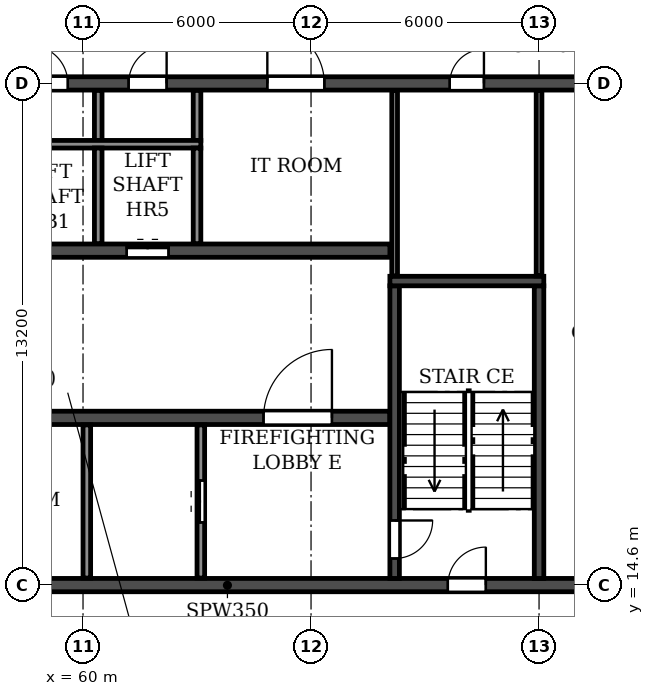
"""IFC4 building model, lengths in metres.
Left out: names, types, materials, properties, quantities, classifications, styles, units other than length and angle.
Written with IfcOpenShell. Run it as: python <this file> out.ifc"""

import sys

from ifc_helpers import new_model, si_unit, direction, frame, frame_2d, origin, place, context, subcontext, project, spatial, rectangle, extrude, element, fill, save


model = new_model("IFC4")
c1 = context("Model", 3, precision=1e-05, world=origin(), true_north=direction((0.0, 1.0)))
c2 = subcontext(c1, "Body", "Model", "MODEL_VIEW")
j1 = project(units=[si_unit("LENGTHUNIT", "METRE"), si_unit("PLANEANGLEUNIT", "RADIAN")], contexts=[c1])
p1 = place(None, origin())
s1 = spatial("IfcSite", under=j1, at=p1, CompositionType="ELEMENT")
p2 = place(p1, origin())
s2 = spatial("IfcBuilding", under=s1, at=p2, CompositionType="ELEMENT")
p3 = place(p2, frame((0.0, 0.0, 251.1)))
s3 = spatial("IfcBuildingStorey", under=s2, at=p3, CompositionType="ELEMENT", Elevation=251.1)
p4 = place(p3, frame((18.2, 14.6, 0.0), z_axis=(0.0, 0.0, 1.0), x_axis=(1.0, 0.0, 0.0)))
e1 = element("IfcWall", 1, at=p4, inside=s3, PredefinedType="SOLIDWALL", context=c2, shape_type="SweptSolid", body=[
    extrude(rectangle(XDim=65.6, YDim=0.35, at=frame_2d((32.8, 0.0))), origin(), (0.0, 0.0, 1.0), 3.08),
])
p5 = place(p4, frame((0.7, 0.0, 0.0)))
e2 = element("IfcOpeningElement", 2, at=p5, cuts=e1, PredefinedType="OPENING", context=c2, shape_type="SweptSolid", body=[
    extrude(rectangle(XDim=1.0, YDim=2.1, at=frame_2d((0.5, 1.05))), frame((0.0, 0.185, 0.0), z_axis=(0.0, -1.0, 0.0), x_axis=(1.0, 0.0, 0.0)), (0.0, 0.0, 1.0), 0.37),
])
p6 = place(p4, frame((8.6, 0.0, 0.0)))
e3 = element("IfcOpeningElement", 3, at=p6, cuts=e1, PredefinedType="OPENING", context=c2, shape_type="SweptSolid", body=[
    extrude(rectangle(XDim=1.0, YDim=2.1, at=frame_2d((0.5, 1.05))), frame((0.0, 0.185, 0.0), z_axis=(0.0, -1.0, 0.0), x_axis=(1.0, 0.0, 0.0)), (0.0, 0.0, 1.0), 0.37),
])
p7 = place(p4, frame((13.2, 0.0, 0.0)))
e4 = element("IfcOpeningElement", 4, at=p7, cuts=e1, PredefinedType="OPENING", context=c2, shape_type="SweptSolid", body=[
    extrude(rectangle(XDim=1.0, YDim=2.1, at=frame_2d((0.5, 1.05))), frame((0.0, 0.185, 0.0), z_axis=(0.0, -1.0, 0.0), x_axis=(1.0, 0.0, 0.0)), (0.0, 0.0, 1.0), 0.37),
])
p8 = place(p4, frame((24.5, 0.0, 0.0)))
e5 = element("IfcOpeningElement", 5, at=p8, cuts=e1, PredefinedType="OPENING", context=c2, shape_type="SweptSolid", body=[
    extrude(rectangle(XDim=1.0, YDim=2.1, at=frame_2d((0.5, 1.05))), frame((0.0, 0.185, 0.0), z_axis=(0.0, -1.0, 0.0), x_axis=(1.0, 0.0, 0.0)), (0.0, 0.0, 1.0), 0.37),
])
p9 = place(p4, frame((28.4, 0.0, 0.0)))
e6 = element("IfcOpeningElement", 6, at=p9, cuts=e1, PredefinedType="OPENING", context=c2, shape_type="SweptSolid", body=[
    extrude(rectangle(XDim=1.0, YDim=2.1, at=frame_2d((0.5, 1.05))), frame((0.0, 0.185, 0.0), z_axis=(0.0, -1.0, 0.0), x_axis=(1.0, 0.0, 0.0)), (0.0, 0.0, 1.0), 0.37),
])
p10 = place(p4, frame((32.3, 0.0, 0.0)))
e7 = element("IfcOpeningElement", 7, at=p10, cuts=e1, PredefinedType="OPENING", context=c2, shape_type="SweptSolid", body=[
    extrude(rectangle(XDim=1.0, YDim=2.1, at=frame_2d((0.5, 1.05))), frame((0.0, 0.185, 0.0), z_axis=(0.0, -1.0, 0.0), x_axis=(1.0, 0.0, 0.0)), (0.0, 0.0, 1.0), 0.37),
])
p11 = place(p4, frame((34.9, 0.0, 0.0)))
e8 = element("IfcOpeningElement", 8, at=p11, cuts=e1, PredefinedType="OPENING", context=c2, shape_type="SweptSolid", body=[
    extrude(rectangle(XDim=1.0, YDim=2.1, at=frame_2d((0.5, 1.05))), frame((0.0, 0.185, 0.0), z_axis=(0.0, -1.0, 0.0), x_axis=(1.0, 0.0, 0.0)), (0.0, 0.0, 1.0), 0.37),
])
p12 = place(p4, frame((38.8, 0.0, 0.0)))
e9 = element("IfcOpeningElement", 9, at=p12, cuts=e1, PredefinedType="OPENING", context=c2, shape_type="SweptSolid", body=[
    extrude(rectangle(XDim=1.0, YDim=2.1, at=frame_2d((0.5, 1.05))), frame((0.0, 0.185, 0.0), z_axis=(0.0, -1.0, 0.0), x_axis=(1.0, 0.0, 0.0)), (0.0, 0.0, 1.0), 0.37),
])
p13 = place(p4, frame((51.4, 0.0, 0.0)))
e10 = element("IfcOpeningElement", 10, at=p13, cuts=e1, PredefinedType="OPENING", context=c2, shape_type="SweptSolid", body=[
    extrude(rectangle(XDim=1.0, YDim=2.1, at=frame_2d((0.5, 1.05))), frame((0.0, 0.185, 0.0), z_axis=(0.0, -1.0, 0.0), x_axis=(1.0, 0.0, 0.0)), (0.0, 0.0, 1.0), 0.37),
])
p14 = place(p4, frame((56.0, 0.0, 0.0)))
e11 = element("IfcOpeningElement", 11, at=p14, cuts=e1, PredefinedType="OPENING", context=c2, shape_type="SweptSolid", body=[
    extrude(rectangle(XDim=1.0, YDim=2.1, at=frame_2d((0.5, 1.05))), frame((0.0, 0.185, 0.0), z_axis=(0.0, -1.0, 0.0), x_axis=(1.0, 0.0, 0.0)), (0.0, 0.0, 1.0), 0.37),
])
p15 = place(p4, frame((63.9, 0.0, 0.0)))
e12 = element("IfcOpeningElement", 12, at=p15, cuts=e1, PredefinedType="OPENING", context=c2, shape_type="SweptSolid", body=[
    extrude(rectangle(XDim=1.0, YDim=2.1, at=frame_2d((0.5, 1.05))), frame((0.0, 0.185, 0.0), z_axis=(0.0, -1.0, 0.0), x_axis=(1.0, 0.0, 0.0)), (0.0, 0.0, 1.0), 0.37),
])
p16 = place(p3, frame((18.2, 27.8, 0.0), z_axis=(0.0, 0.0, 1.0), x_axis=(1.0, 0.0, 0.0)))
e13 = element("IfcWall", 13, at=p16, inside=s3, PredefinedType="SOLIDWALL", context=c2, shape_type="SweptSolid", body=[
    extrude(rectangle(XDim=65.6, YDim=0.35, at=frame_2d((32.8, 0.0))), origin(), (0.0, 0.0, 1.0), 3.08),
])
p17 = place(p16, frame((0.7, 0.0, 0.0)))
e14 = element("IfcOpeningElement", 14, at=p17, cuts=e13, PredefinedType="OPENING", context=c2, shape_type="SweptSolid", body=[
    extrude(rectangle(XDim=1.0, YDim=2.1, at=frame_2d((0.5, 1.05))), frame((0.0, 0.185, 0.0), z_axis=(0.0, -1.0, 0.0), x_axis=(1.0, 0.0, 0.0)), (0.0, 0.0, 1.0), 0.37),
])
p18 = place(p16, frame((4.05, 0.0, 0.0)))
e15 = element("IfcOpeningElement", 15, at=p18, cuts=e13, PredefinedType="OPENING", context=c2, shape_type="SweptSolid", body=[
    extrude(rectangle(XDim=0.9, YDim=2.1, at=frame_2d((0.45, 1.05))), frame((0.0, 0.185, 0.0), z_axis=(0.0, -1.0, 0.0), x_axis=(1.0, 0.0, 0.0)), (0.0, 0.0, 1.0), 0.37),
])
p19 = place(p16, frame((13.25, 0.0, 0.0)))
e16 = element("IfcOpeningElement", 16, at=p19, cuts=e13, PredefinedType="OPENING", context=c2, shape_type="SweptSolid", body=[
    extrude(rectangle(XDim=0.9, YDim=2.1, at=frame_2d((0.45, 1.05))), frame((0.0, 0.185, 0.0), z_axis=(0.0, -1.0, 0.0), x_axis=(1.0, 0.0, 0.0)), (0.0, 0.0, 1.0), 0.37),
])
p20 = place(p16, frame((19.0, 0.0, 0.0)))
e17 = element("IfcOpeningElement", 17, at=p20, cuts=e13, PredefinedType="OPENING", context=c2, shape_type="SweptSolid", body=[
    extrude(rectangle(XDim=1.0, YDim=2.1, at=frame_2d((0.5, 1.05))), frame((0.0, 0.185, 0.0), z_axis=(0.0, -1.0, 0.0), x_axis=(1.0, 0.0, 0.0)), (0.0, 0.0, 1.0), 0.37),
])
p21 = place(p16, frame((24.2, 0.0, 0.0)))
e18 = element("IfcOpeningElement", 18, at=p21, cuts=e13, PredefinedType="OPENING", context=c2, shape_type="SweptSolid", body=[
    extrude(rectangle(XDim=1.0, YDim=2.1, at=frame_2d((0.5, 1.05))), frame((0.0, 0.185, 0.0), z_axis=(0.0, -1.0, 0.0), x_axis=(1.0, 0.0, 0.0)), (0.0, 0.0, 1.0), 0.37),
])
p22 = place(p16, frame((29.4, 0.0, 0.0)))
e19 = element("IfcOpeningElement", 19, at=p22, cuts=e13, PredefinedType="OPENING", context=c2, shape_type="SweptSolid", body=[
    extrude(rectangle(XDim=1.0, YDim=2.1, at=frame_2d((0.5, 1.05))), frame((0.0, 0.185, 0.0), z_axis=(0.0, -1.0, 0.0), x_axis=(1.0, 0.0, 0.0)), (0.0, 0.0, 1.0), 0.37),
])
p23 = place(p16, frame((32.3, 0.0, 0.0)))
e20 = element("IfcOpeningElement", 20, at=p23, cuts=e13, PredefinedType="OPENING", context=c2, shape_type="SweptSolid", body=[
    extrude(rectangle(XDim=1.0, YDim=2.1, at=frame_2d((0.5, 1.05))), frame((0.0, 0.185, 0.0), z_axis=(0.0, -1.0, 0.0), x_axis=(1.0, 0.0, 0.0)), (0.0, 0.0, 1.0), 0.37),
])
p24 = place(p16, frame((36.5, 0.0, 0.0)))
e21 = element("IfcOpeningElement", 21, at=p24, cuts=e13, PredefinedType="OPENING", context=c2, shape_type="SweptSolid", body=[
    extrude(rectangle(XDim=1.0, YDim=2.1, at=frame_2d((0.5, 1.05))), frame((0.0, 0.185, 0.0), z_axis=(0.0, -1.0, 0.0), x_axis=(1.0, 0.0, 0.0)), (0.0, 0.0, 1.0), 0.37),
])
p25 = place(p16, frame((40.4, 0.0, 0.0)))
e22 = element("IfcOpeningElement", 22, at=p25, cuts=e13, PredefinedType="OPENING", context=c2, shape_type="SweptSolid", body=[
    extrude(rectangle(XDim=1.0, YDim=2.1, at=frame_2d((0.5, 1.05))), frame((0.0, 0.185, 0.0), z_axis=(0.0, -1.0, 0.0), x_axis=(1.0, 0.0, 0.0)), (0.0, 0.0, 1.0), 0.37),
])
p26 = place(p16, frame((43.0, 0.0, 0.0)))
e23 = element("IfcOpeningElement", 23, at=p26, cuts=e13, PredefinedType="OPENING", context=c2, shape_type="SweptSolid", body=[
    extrude(rectangle(XDim=1.0, YDim=2.1, at=frame_2d((0.5, 1.05))), frame((0.0, 0.185, 0.0), z_axis=(0.0, -1.0, 0.0), x_axis=(1.0, 0.0, 0.0)), (0.0, 0.0, 1.0), 0.37),
])
p27 = place(p16, frame((46.65, 0.0, 0.0)))
e24 = element("IfcOpeningElement", 24, at=p27, cuts=e13, PredefinedType="OPENING", context=c2, shape_type="SweptSolid", body=[
    extrude(rectangle(XDim=1.5, YDim=2.1, at=frame_2d((0.75, 1.05))), frame((0.0, 0.185, 0.0), z_axis=(0.0, -1.0, 0.0), x_axis=(1.0, 0.0, 0.0)), (0.0, 0.0, 1.0), 0.37),
])
p28 = place(p16, frame((51.45, 0.0, 0.0)))
e25 = element("IfcOpeningElement", 25, at=p28, cuts=e13, PredefinedType="OPENING", context=c2, shape_type="SweptSolid", body=[
    extrude(rectangle(XDim=0.9, YDim=2.1, at=frame_2d((0.45, 1.05))), frame((0.0, 0.185, 0.0), z_axis=(0.0, -1.0, 0.0), x_axis=(1.0, 0.0, 0.0)), (0.0, 0.0, 1.0), 0.37),
])
p29 = place(p16, frame((60.65, 0.0, 0.0)))
e26 = element("IfcOpeningElement", 26, at=p29, cuts=e13, PredefinedType="OPENING", context=c2, shape_type="SweptSolid", body=[
    extrude(rectangle(XDim=0.9, YDim=2.1, at=frame_2d((0.45, 1.05))), frame((0.0, 0.185, 0.0), z_axis=(0.0, -1.0, 0.0), x_axis=(1.0, 0.0, 0.0)), (0.0, 0.0, 1.0), 0.37),
])
p30 = place(p16, frame((63.9, 0.0, 0.0)))
e27 = element("IfcOpeningElement", 27, at=p30, cuts=e13, PredefinedType="OPENING", context=c2, shape_type="SweptSolid", body=[
    extrude(rectangle(XDim=1.0, YDim=2.1, at=frame_2d((0.5, 1.05))), frame((0.0, 0.185, 0.0), z_axis=(0.0, -1.0, 0.0), x_axis=(1.0, 0.0, 0.0)), (0.0, 0.0, 1.0), 0.37),
])
p31 = place(p3, frame((33.925, 19.0, 0.0), z_axis=(0.0, 0.0, 1.0), x_axis=(1.0, 0.0, 0.0)))
e28 = element("IfcWall", 28, at=p31, inside=s3, PredefinedType="SOLIDWALL", context=c2, shape_type="SweptSolid", body=[
    extrude(rectangle(XDim=34.15, YDim=0.35, at=frame_2d((17.075, 0.0))), origin(), (0.0, 0.0, 1.0), 3.08),
])
p32 = place(p31, frame((16.175, 0.0, 0.0)))
e29 = element("IfcOpeningElement", 29, at=p32, cuts=e28, PredefinedType="OPENING", context=c2, shape_type="SweptSolid", body=[
    extrude(rectangle(XDim=1.8, YDim=2.1, at=frame_2d((0.9, 1.05))), frame((0.0, 0.185, 0.0), z_axis=(0.0, -1.0, 0.0), x_axis=(1.0, 0.0, 0.0)), (0.0, 0.0, 1.0), 0.37),
])
p33 = place(p31, frame((1.525, 0.0, 0.0)))
e30 = element("IfcOpeningElement", 30, at=p33, cuts=e28, PredefinedType="OPENING", context=c2, shape_type="SweptSolid", body=[
    extrude(rectangle(XDim=1.8, YDim=2.1, at=frame_2d((0.9, 1.05))), frame((0.0, 0.185, 0.0), z_axis=(0.0, -1.0, 0.0), x_axis=(1.0, 0.0, 0.0)), (0.0, 0.0, 1.0), 0.37),
])
p34 = place(p31, frame((30.825, 0.0, 0.0)))
e31 = element("IfcOpeningElement", 31, at=p34, cuts=e28, PredefinedType="OPENING", context=c2, shape_type="SweptSolid", body=[
    extrude(rectangle(XDim=1.8, YDim=2.1, at=frame_2d((0.9, 1.05))), frame((0.0, 0.185, 0.0), z_axis=(0.0, -1.0, 0.0), x_axis=(1.0, 0.0, 0.0)), (0.0, 0.0, 1.0), 0.37),
])
p35 = place(p3, frame((33.925, 23.4, 0.0), z_axis=(0.0, 0.0, 1.0), x_axis=(1.0, 0.0, 0.0)))
e32 = element("IfcWall", 32, at=p35, inside=s3, PredefinedType="SOLIDWALL", context=c2, shape_type="SweptSolid", body=[
    extrude(rectangle(XDim=34.15, YDim=0.35, at=frame_2d((17.075, 0.0))), origin(), (0.0, 0.0, 1.0), 3.08),
])
p36 = place(p35, frame((16.175, 0.0, 0.0)))
e33 = element("IfcOpeningElement", 33, at=p36, cuts=e32, PredefinedType="OPENING", context=c2, shape_type="SweptSolid", body=[
    extrude(rectangle(XDim=1.8, YDim=2.1, at=frame_2d((0.9, 1.05))), frame((0.0, 0.185, 0.0), z_axis=(0.0, -1.0, 0.0), x_axis=(1.0, 0.0, 0.0)), (0.0, 0.0, 1.0), 0.37),
])
p37 = place(p35, frame((0.625, 0.0, 0.0)))
e34 = element("IfcOpeningElement", 34, at=p37, cuts=e32, PredefinedType="OPENING", context=c2, shape_type="SweptSolid", body=[
    extrude(rectangle(XDim=1.1, YDim=2.1, at=frame_2d((0.55, 1.05))), frame((0.0, 0.185, 0.0), z_axis=(0.0, -1.0, 0.0), x_axis=(1.0, 0.0, 0.0)), (0.0, 0.0, 1.0), 0.37),
])
p38 = place(p35, frame((3.225, 0.0, 0.0)))
e35 = element("IfcOpeningElement", 35, at=p38, cuts=e32, PredefinedType="OPENING", context=c2, shape_type="SweptSolid", body=[
    extrude(rectangle(XDim=1.1, YDim=2.1, at=frame_2d((0.55, 1.05))), frame((0.0, 0.185, 0.0), z_axis=(0.0, -1.0, 0.0), x_axis=(1.0, 0.0, 0.0)), (0.0, 0.0, 1.0), 0.37),
])
p39 = place(p35, frame((5.825, 0.0, 0.0)))
e36 = element("IfcOpeningElement", 36, at=p39, cuts=e32, PredefinedType="OPENING", context=c2, shape_type="SweptSolid", body=[
    extrude(rectangle(XDim=1.1, YDim=2.1, at=frame_2d((0.55, 1.05))), frame((0.0, 0.185, 0.0), z_axis=(0.0, -1.0, 0.0), x_axis=(1.0, 0.0, 0.0)), (0.0, 0.0, 1.0), 0.37),
])
p40 = place(p35, frame((8.425, 0.0, 0.0)))
e37 = element("IfcOpeningElement", 37, at=p40, cuts=e32, PredefinedType="OPENING", context=c2, shape_type="SweptSolid", body=[
    extrude(rectangle(XDim=1.1, YDim=2.1, at=frame_2d((0.55, 1.05))), frame((0.0, 0.185, 0.0), z_axis=(0.0, -1.0, 0.0), x_axis=(1.0, 0.0, 0.0)), (0.0, 0.0, 1.0), 0.37),
])
p41 = place(p35, frame((11.025, 0.0, 0.0)))
e38 = element("IfcOpeningElement", 38, at=p41, cuts=e32, PredefinedType="OPENING", context=c2, shape_type="SweptSolid", body=[
    extrude(rectangle(XDim=1.1, YDim=2.1, at=frame_2d((0.55, 1.05))), frame((0.0, 0.185, 0.0), z_axis=(0.0, -1.0, 0.0), x_axis=(1.0, 0.0, 0.0)), (0.0, 0.0, 1.0), 0.37),
])
p42 = place(p35, frame((13.625, 0.0, 0.0)))
e39 = element("IfcOpeningElement", 39, at=p42, cuts=e32, PredefinedType="OPENING", context=c2, shape_type="SweptSolid", body=[
    extrude(rectangle(XDim=1.1, YDim=2.1, at=frame_2d((0.55, 1.05))), frame((0.0, 0.185, 0.0), z_axis=(0.0, -1.0, 0.0), x_axis=(1.0, 0.0, 0.0)), (0.0, 0.0, 1.0), 0.37),
])
p43 = place(p35, frame((27.225, 0.0, 0.0)))
e40 = element("IfcOpeningElement", 40, at=p43, cuts=e32, PredefinedType="OPENING", context=c2, shape_type="SweptSolid", body=[
    extrude(rectangle(XDim=1.1, YDim=2.1, at=frame_2d((0.55, 1.05))), frame((0.0, 0.185, 0.0), z_axis=(0.0, -1.0, 0.0), x_axis=(1.0, 0.0, 0.0)), (0.0, 0.0, 1.0), 0.37),
])
p44 = place(p3, frame((68.2, 14.775, 0.0), z_axis=(0.0, 0.0, 1.0), x_axis=(0.0, 1.0, 0.0)))
e41 = element("IfcWall", 41, at=p44, inside=s3, PredefinedType="SOLIDWALL", context=c2, shape_type="SweptSolid", body=[
    extrude(rectangle(XDim=7.7, YDim=0.25, at=frame_2d((3.85, 0.0))), origin(), (0.0, 0.0, 1.0), 3.08),
])
p45 = place(p44, frame((0.525, 0.0, 0.0)))
e42 = element("IfcOpeningElement", 42, at=p45, cuts=e41, PredefinedType="OPENING", context=c2, shape_type="SweptSolid", body=[
    extrude(rectangle(XDim=1.0, YDim=2.1, at=frame_2d((0.5, 1.05))), frame((0.0, 0.135, 0.0), z_axis=(0.0, -1.0, 0.0), x_axis=(1.0, 0.0, 0.0)), (0.0, 0.0, 1.0), 0.27),
])
p46 = place(p3, frame((72.0, 14.775, 0.0), z_axis=(0.0, 0.0, 1.0), x_axis=(0.0, 1.0, 0.0)))
e43 = element("IfcWall", 43, at=p46, inside=s3, PredefinedType="SOLIDWALL", context=c2, shape_type="SweptSolid", body=[
    extrude(rectangle(XDim=7.7, YDim=0.25, at=frame_2d((3.85, 0.0))), origin(), (0.0, 0.0, 1.0), 3.08),
])
p47 = place(p3, frame((68.075, 22.6, 0.0), z_axis=(0.0, 0.0, 1.0), x_axis=(1.0, 0.0, 0.0)))
e44 = element("IfcWall", 44, at=p47, inside=s3, PredefinedType="SOLIDWALL", context=c2, shape_type="SweptSolid", body=[
    extrude(rectangle(XDim=4.05, YDim=0.25, at=frame_2d((2.025, 0.0))), origin(), (0.0, 0.0, 1.0), 3.08),
])
for number, where, z_axis, x_axis in (
    (45, (60.4, 26.3, 0.0), (0.0, 0.0, 1.0), (0.0, 1.0, 0.0)),
    (46, (63.0, 26.3, 0.0), (0.0, 0.0, 1.0), (0.0, 1.0, 0.0)),
):
    element("IfcWall", number, at=place(p3, frame(where, z_axis=z_axis, x_axis=x_axis)), inside=s3, PredefinedType="PARTITIONING", context=c2, shape_type="SweptSolid", body=[
        extrude(rectangle(XDim=1.315, YDim=0.2, at=frame_2d((0.657, 0.0))), origin(), (0.0, 0.0, 1.0), 3.08),
    ])
for number, where, z_axis, x_axis in (
    (47, (68.2, 22.735, 0.0), (0.0, 0.0, 1.0), (0.0, 1.0, 0.0)),
    (48, (72.0, 22.735, 0.0), (0.0, 0.0, 1.0), (0.0, 1.0, 0.0)),
):
    element("IfcWall", number, at=place(p3, frame(where, z_axis=z_axis, x_axis=x_axis)), inside=s3, PredefinedType="PARTITIONING", context=c2, shape_type="SweptSolid", body=[
        extrude(rectangle(XDim=4.88, YDim=0.15, at=frame_2d((2.44, 0.0))), origin(), (0.0, 0.0, 1.0), 3.08),
    ])
p48 = place(p3, frame((57.7, 26.2, 0.0), z_axis=(0.0, 0.0, 1.0), x_axis=(1.0, 0.0, 0.0)))
e49 = element("IfcWall", 49, at=p48, inside=s3, PredefinedType="PARTITIONING", context=c2, shape_type="SweptSolid", body=[
    extrude(rectangle(XDim=5.4, YDim=0.2, at=frame_2d((2.7, 0.0))), origin(), (0.0, 0.0, 1.0), 3.08),
])
p49 = place(p3, frame((60.1, 14.785, 0.0), z_axis=(0.0, 0.0, 1.0), x_axis=(0.0, 1.0, 0.0)))
e50 = element("IfcWall", 50, at=p49, inside=s3, PredefinedType="PARTITIONING", context=c2, shape_type="SweptSolid", body=[
    extrude(rectangle(XDim=4.03, YDim=0.2, at=frame_2d((2.015, 0.0))), origin(), (0.0, 0.0, 1.0), 3.08),
])
for number, where, z_axis, x_axis in (
    (51, (60.4, 23.585, 0.0), (0.0, 0.0, 1.0), (0.0, 1.0, 0.0)),
    (52, (63.0, 23.585, 0.0), (0.0, 0.0, 1.0), (0.0, 1.0, 0.0)),
):
    element("IfcWall", number, at=place(p3, frame(where, z_axis=z_axis, x_axis=x_axis)), inside=s3, PredefinedType="PARTITIONING", context=c2, shape_type="SweptSolid", body=[
        extrude(rectangle(XDim=2.515, YDim=0.2, at=frame_2d((1.258, 0.0))), origin(), (0.0, 0.0, 1.0), 3.08),
    ])
p50 = place(p3, frame((63.1, 14.785, 0.0), z_axis=(0.0, 0.0, 1.0), x_axis=(0.0, 1.0, 0.0)))
e53 = element("IfcWall", 53, at=p50, inside=s3, PredefinedType="PARTITIONING", context=c2, shape_type="SweptSolid", body=[
    extrude(rectangle(XDim=4.03, YDim=0.2, at=frame_2d((2.015, 0.0))), origin(), (0.0, 0.0, 1.0), 3.08),
])
p51 = place(p50, frame((1.465, 0.0, 0.0)))
e54 = element("IfcOpeningElement", 54, at=p51, cuts=e53, PredefinedType="OPENING", context=c2, shape_type="SweptSolid", body=[
    extrude(rectangle(XDim=1.1, YDim=2.1, at=frame_2d((0.55, 1.05))), frame((0.0, 0.11, 0.0), z_axis=(0.0, -1.0, 0.0), x_axis=(1.0, 0.0, 0.0)), (0.0, 0.0, 1.0), 0.22),
])
p52 = place(p25, origin())
e55 = element("IfcDoor", 55, at=p52, inside=s3, OperationType="SINGLE_SWING_LEFT", PredefinedType="DOOR", context=c2, shape_type="SweptSolid", body=[
    extrude(rectangle(XDim=1.0, YDim=2.1, at=frame_2d((0.5, 1.05))), frame((0.0, 0.025, 0.0), z_axis=(0.0, -1.0, 0.0), x_axis=(1.0, 0.0, 0.0)), (0.0, 0.0, 1.0), 0.05),
])
fill(e22, e55)
p53 = place(p26, origin())
e56 = element("IfcDoor", 56, at=p53, inside=s3, OperationType="SINGLE_SWING_RIGHT", PredefinedType="DOOR", context=c2, shape_type="SweptSolid", body=[
    extrude(rectangle(XDim=1.0, YDim=2.1, at=frame_2d((0.5, 1.05))), frame((0.0, 0.025, 0.0), z_axis=(0.0, -1.0, 0.0), x_axis=(1.0, 0.0, 0.0)), (0.0, 0.0, 1.0), 0.05),
])
fill(e23, e56)
p54 = place(p27, origin())
e57 = element("IfcDoor", 57, at=p54, inside=s3, OperationType="DOUBLE_DOOR_SINGLE_SWING", PredefinedType="DOOR", context=c2, shape_type="SweptSolid", body=[
    extrude(rectangle(XDim=1.5, YDim=2.1, at=frame_2d((0.75, 1.05))), frame((0.0, 0.025, 0.0), z_axis=(0.0, -1.0, 0.0), x_axis=(1.0, 0.0, 0.0)), (0.0, 0.0, 1.0), 0.05),
])
fill(e24, e57)
p55 = place(p28, origin())
e58 = element("IfcDoor", 58, at=p55, inside=s3, OperationType="SINGLE_SWING_RIGHT", PredefinedType="DOOR", context=c2, shape_type="SweptSolid", body=[
    extrude(rectangle(XDim=0.9, YDim=2.1, at=frame_2d((0.45, 1.05))), frame((0.0, 0.025, 0.0), z_axis=(0.0, -1.0, 0.0), x_axis=(1.0, 0.0, 0.0)), (0.0, 0.0, 1.0), 0.05),
])
fill(e25, e58)
p56 = place(p13, origin())
e59 = element("IfcDoor", 59, at=p56, inside=s3, OperationType="SINGLE_SWING_RIGHT", PredefinedType="DOOR", context=c2, shape_type="SweptSolid", body=[
    extrude(rectangle(XDim=1.0, YDim=2.1, at=frame_2d((0.5, 1.05))), frame((0.0, 0.025, 0.0), z_axis=(0.0, -1.0, 0.0), x_axis=(1.0, 0.0, 0.0)), (0.0, 0.0, 1.0), 0.05),
])
fill(e10, e59)
p57 = place(p51, origin())
e60 = element("IfcDoor", 60, at=p57, inside=s3, OperationType="DOUBLE_DOOR_SLIDING", PredefinedType="DOOR", context=c2, shape_type="SweptSolid", body=[
    extrude(rectangle(XDim=1.1, YDim=2.1, at=frame_2d((0.55, 1.05))), frame((0.0, 0.025, 0.0), z_axis=(0.0, -1.0, 0.0), x_axis=(1.0, 0.0, 0.0)), (0.0, 0.0, 1.0), 0.05),
])
fill(e54, e60)
p58 = place(p45, frame((1.0, 0.0, 0.0), z_axis=(0.0, 0.0, 1.0), x_axis=(-1.0, 0.0, 0.0)))
e61 = element("IfcDoor", 61, at=p58, inside=s3, OperationType="SINGLE_SWING_LEFT", PredefinedType="DOOR", context=c2, shape_type="SweptSolid", body=[
    extrude(rectangle(XDim=1.0, YDim=2.1, at=frame_2d((0.5, 1.05))), frame((0.0, 0.025, 0.0), z_axis=(0.0, -1.0, 0.0), x_axis=(1.0, 0.0, 0.0)), (0.0, 0.0, 1.0), 0.05),
])
fill(e42, e61)
p59 = place(p43, origin())
e62 = element("IfcDoor", 62, at=p59, inside=s3, OperationType="DOUBLE_DOOR_SLIDING", PredefinedType="DOOR", context=c2, shape_type="SweptSolid", body=[
    extrude(rectangle(XDim=1.1, YDim=2.1, at=frame_2d((0.55, 1.05))), frame((0.0, 0.025, 0.0), z_axis=(0.0, -1.0, 0.0), x_axis=(1.0, 0.0, 0.0)), (0.0, 0.0, 1.0), 0.05),
])
fill(e40, e62)
p60 = place(p34, origin())
e63 = element("IfcDoor", 63, at=p60, inside=s3, OperationType="DOUBLE_DOOR_SINGLE_SWING", PredefinedType="DOOR", context=c2, shape_type="SweptSolid", body=[
    extrude(rectangle(XDim=1.8, YDim=2.1, at=frame_2d((0.9, 1.05))), frame((0.0, 0.025, 0.0), z_axis=(0.0, -1.0, 0.0), x_axis=(1.0, 0.0, 0.0)), (0.0, 0.0, 1.0), 0.05),
])
fill(e31, e63)
save(model, sys.argv[1])
